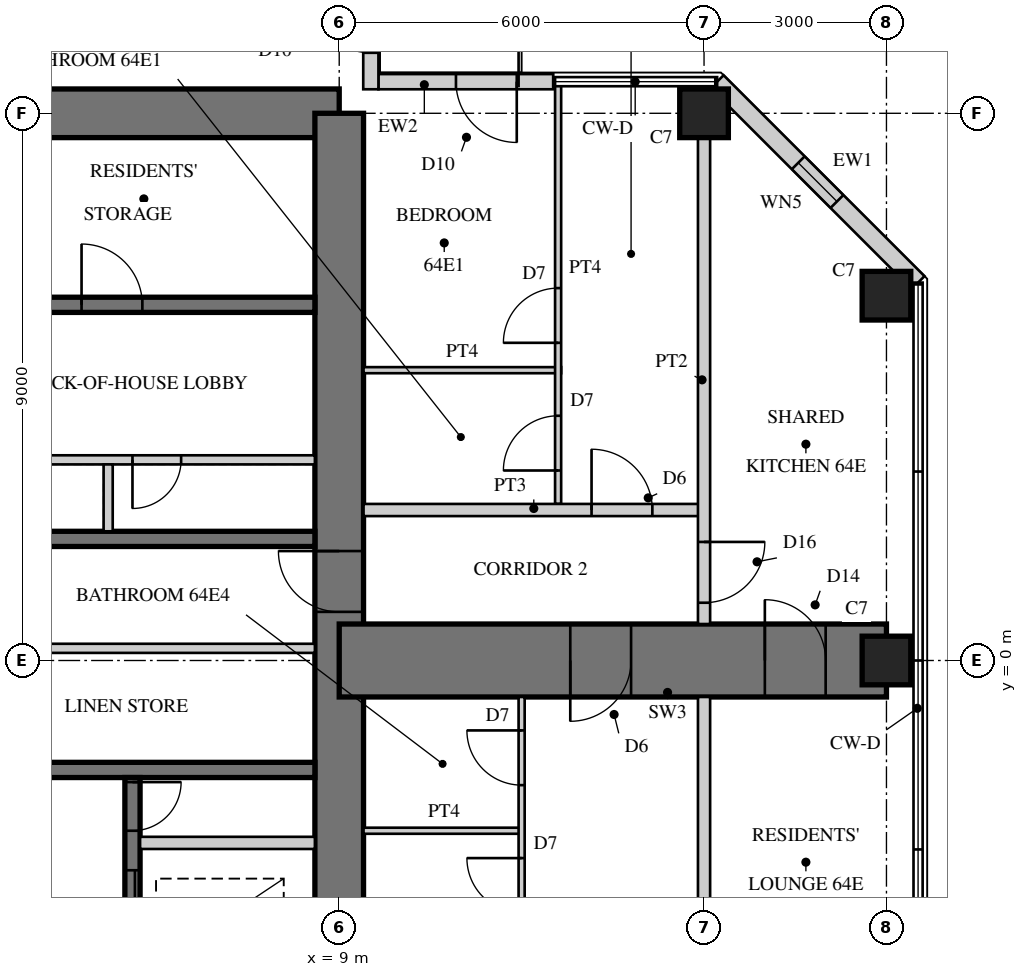
"""IFC4 building model, lengths in metres.
Left out: names, types, materials, properties, quantities, classifications, styles, units other than length and angle.
Written with IfcOpenShell. Run it as: python <this file> out.ifc"""

import sys

from ifc_helpers import new_model, si_unit, direction, frame, frame_2d, origin, origin_2d, place, context, subcontext, project, spatial, rectangle, hollow_rectangle, extrude, element, fill, save


model = new_model("IFC4")
c1 = context("Model", 3, precision=1e-05, world=origin(), true_north=direction((0.0, 1.0)))
c2 = subcontext(c1, "Body", "Model", "MODEL_VIEW")
j1 = project(units=[si_unit("LENGTHUNIT", "METRE"), si_unit("PLANEANGLEUNIT", "RADIAN")], contexts=[c1])
p1 = place(None, origin())
s1 = spatial("IfcSite", under=j1, at=p1, CompositionType="ELEMENT")
p2 = place(p1, origin())
s2 = spatial("IfcBuilding", under=s1, at=p2, CompositionType="ELEMENT")
p3 = place(p2, frame((0.0, 0.0, 249.3)))
s3 = spatial("IfcBuildingStorey", under=s2, at=p3, CompositionType="ELEMENT", Elevation=249.3)
p4 = place(p3, frame((9.0, 9.0, 0.0), z_axis=(0.0, 0.0, 1.0), x_axis=(-1.0, 0.0, 0.0)))
e1 = element("IfcWall", 1, at=p4, inside=s3, PredefinedType="SHEAR", context=c2, shape_type="SweptSolid", body=[
    extrude(rectangle(XDim=18.0, YDim=0.8, at=frame_2d((9.0, 0.0))), origin(), (0.0, 0.0, 1.0), 3.4),
])
p5 = place(p4, frame((9.8, 0.0, 0.0)))
e2 = element("IfcOpeningElement", 2, at=p5, cuts=e1, PredefinedType="OPENING", context=c2, shape_type="SweptSolid", body=[
    extrude(rectangle(XDim=1.0, YDim=2.4, at=frame_2d((0.5, 1.2))), frame((0.0, 0.41, 0.0), z_axis=(0.0, -1.0, 0.0), x_axis=(1.0, 0.0, 0.0)), (0.0, 0.0, 1.0), 0.82),
])
p6 = place(p3, frame((9.0, -9.0, 0.0), z_axis=(0.0, 0.0, 1.0), x_axis=(0.0, 1.0, 0.0)))
e3 = element("IfcWall", 3, at=p6, inside=s3, PredefinedType="SHEAR", context=c2, shape_type="SweptSolid", body=[
    extrude(rectangle(XDim=18.0, YDim=0.8, at=frame_2d((9.0, 0.0))), origin(), (0.0, 0.0, 1.0), 3.4),
])
p7 = place(p6, frame((9.8, 0.0, 0.0)))
e4 = element("IfcOpeningElement", 4, at=p7, cuts=e3, PredefinedType="OPENING", context=c2, shape_type="SweptSolid", body=[
    extrude(rectangle(XDim=1.0, YDim=2.4, at=frame_2d((0.5, 1.2))), frame((0.0, 0.41, 0.0), z_axis=(0.0, -1.0, 0.0), x_axis=(1.0, 0.0, 0.0)), (0.0, 0.0, 1.0), 0.82),
])
p8 = place(p3, frame((1.925, 2.0, 0.0), z_axis=(0.0, 0.0, 1.0), x_axis=(1.0, 0.0, 0.0)))
e5 = element("IfcWall", 5, at=p8, inside=s3, PredefinedType="SHEAR", context=c2, shape_type="SweptSolid", body=[
    extrude(rectangle(XDim=6.675, YDim=0.25, at=frame_2d((3.337, 0.0))), origin(), (0.0, 0.0, 1.0), 3.4),
])
p9 = place(p3, frame((1.925, 5.85, 0.0), z_axis=(0.0, 0.0, 1.0), x_axis=(1.0, 0.0, 0.0)))
e6 = element("IfcWall", 6, at=p9, inside=s3, PredefinedType="SHEAR", context=c2, shape_type="SweptSolid", body=[
    extrude(rectangle(XDim=6.675, YDim=0.25, at=frame_2d((3.337, 0.0))), origin(), (0.0, 0.0, 1.0), 3.4),
])
p10 = place(p9, frame((0.546, 0.0, 0.0)))
e7 = element("IfcOpeningElement", 7, at=p10, cuts=e6, PredefinedType="OPENING", context=c2, shape_type="SweptSolid", body=[
    extrude(rectangle(XDim=1.0, YDim=2.1, at=frame_2d((0.5, 1.05))), frame((0.0, 0.135, 0.0), z_axis=(0.0, -1.0, 0.0), x_axis=(1.0, 0.0, 0.0)), (0.0, 0.0, 1.0), 0.27),
])
p11 = place(p9, frame((2.837, 0.0, 0.0)))
e8 = element("IfcOpeningElement", 8, at=p11, cuts=e6, PredefinedType="OPENING", context=c2, shape_type="SweptSolid", body=[
    extrude(rectangle(XDim=1.0, YDim=2.1, at=frame_2d((0.5, 1.05))), frame((0.0, 0.135, 0.0), z_axis=(0.0, -1.0, 0.0), x_axis=(1.0, 0.0, 0.0)), (0.0, 0.0, 1.0), 0.27),
])
p12 = place(p3, frame((1.925, 3.3, 0.0), z_axis=(0.0, 0.0, 1.0), x_axis=(1.0, 0.0, 0.0)))
e9 = element("IfcWall", 9, at=p12, inside=s3, PredefinedType="PARTITIONING", context=c2, shape_type="SweptSolid", body=[
    extrude(rectangle(XDim=6.675, YDim=0.15, at=frame_2d((3.337, 0.0))), origin(), (0.0, 0.0, 1.0), 3.4),
])
p13 = place(p12, frame((0.075, 0.0, 0.0)))
e10 = element("IfcOpeningElement", 10, at=p13, cuts=e9, PredefinedType="OPENING", context=c2, shape_type="SweptSolid", body=[
    extrude(rectangle(XDim=0.8, YDim=2.1, at=frame_2d((0.4, 1.05))), frame((0.0, 0.085, 0.0), z_axis=(0.0, -1.0, 0.0), x_axis=(1.0, 0.0, 0.0)), (0.0, 0.0, 1.0), 0.17),
])
p14 = place(p12, frame((3.675, 0.0, 0.0)))
e11 = element("IfcOpeningElement", 11, at=p14, cuts=e9, PredefinedType="OPENING", context=c2, shape_type="SweptSolid", body=[
    extrude(rectangle(XDim=0.8, YDim=2.1, at=frame_2d((0.4, 1.05))), frame((0.0, 0.085, 0.0), z_axis=(0.0, -1.0, 0.0), x_axis=(1.0, 0.0, 0.0)), (0.0, 0.0, 1.0), 0.17),
])
p15 = place(p3, frame((5.2, 2.125, 0.0), z_axis=(0.0, 0.0, 1.0), x_axis=(0.0, 1.0, 0.0)))
e12 = element("IfcWall", 12, at=p15, inside=s3, PredefinedType="PARTITIONING", context=c2, shape_type="SweptSolid", body=[
    extrude(rectangle(XDim=1.1, YDim=0.15, at=frame_2d((0.55, 0.0))), origin(), (0.0, 0.0, 1.0), 3.4),
])
p16 = place(p3, frame((2.125, -1.8, 0.0), z_axis=(0.0, 0.0, 1.0), x_axis=(1.0, 0.0, 0.0)))
e13 = element("IfcWall", 13, at=p16, inside=s3, PredefinedType="SHEAR", context=c2, shape_type="SweptSolid", body=[
    extrude(rectangle(XDim=6.475, YDim=0.25, at=frame_2d((3.238, 0.0))), origin(), (0.0, 0.0, 1.0), 3.4),
])
p17 = place(p3, frame((5.6, -1.925, 0.0), z_axis=(0.0, 0.0, 1.0), x_axis=(0.0, -1.0, 0.0)))
e14 = element("IfcWall", 14, at=p17, inside=s3, PredefinedType="SHEAR", context=c2, shape_type="SweptSolid", body=[
    extrude(rectangle(XDim=3.55, YDim=0.25, at=frame_2d((1.775, 0.0))), origin(), (0.0, 0.0, 1.0), 3.4),
])
p18 = place(p17, frame((1.525, 0.0, 0.0)))
e15 = element("IfcOpeningElement", 15, at=p18, cuts=e14, PredefinedType="OPENING", context=c2, shape_type="SweptSolid", body=[
    extrude(rectangle(XDim=1.1, YDim=2.2, at=frame_2d((0.55, 1.1))), frame((0.0, 0.135, 0.0), z_axis=(0.0, -1.0, 0.0), x_axis=(1.0, 0.0, 0.0)), (0.0, 0.0, 1.0), 0.27),
])
p19 = place(p17, frame((0.075, 0.0, 0.0)))
e16 = element("IfcOpeningElement", 16, at=p19, cuts=e14, PredefinedType="OPENING", context=c2, shape_type="SweptSolid", body=[
    extrude(rectangle(XDim=0.8, YDim=2.1, at=frame_2d((0.4, 1.05))), frame((0.0, 0.135, 0.0), z_axis=(0.0, -1.0, 0.0), x_axis=(1.0, 0.0, 0.0)), (0.0, 0.0, 1.0), 0.27),
])
p20 = place(p3, frame((5.725, -3.0, 0.0), z_axis=(0.0, 0.0, 1.0), x_axis=(1.0, 0.0, 0.0)))
e17 = element("IfcWall", 17, at=p20, inside=s3, PredefinedType="PARTITIONING", context=c2, shape_type="SweptSolid", body=[
    extrude(rectangle(XDim=2.875, YDim=0.2, at=frame_2d((1.438, 0.0))), origin(), (0.0, 0.0, 1.0), 3.4),
])
p21 = place(p3, frame((9.0, 0.0, 0.0), z_axis=(0.0, 0.0, 1.0), x_axis=(1.0, 0.0, 0.0)))
e18 = element("IfcWall", 18, at=p21, inside=s3, PredefinedType="SHEAR", context=c2, shape_type="SweptSolid", body=[
    extrude(rectangle(XDim=9.0, YDim=1.2, at=frame_2d((4.5, 0.0))), origin(), (0.0, 0.0, 1.0), 3.4),
])
p22 = place(p21, frame((3.8, 0.0, 0.0)))
e19 = element("IfcOpeningElement", 19, at=p22, cuts=e18, PredefinedType="OPENING", context=c2, shape_type="SweptSolid", body=[
    extrude(rectangle(XDim=1.0, YDim=2.15, at=frame_2d((0.5, 1.075))), frame((0.0, 0.61, 0.0), z_axis=(0.0, -1.0, 0.0), x_axis=(1.0, 0.0, 0.0)), (0.0, 0.0, 1.0), 1.22),
])
p23 = place(p21, frame((7.0, 0.0, 0.0)))
e20 = element("IfcOpeningElement", 20, at=p23, cuts=e18, PredefinedType="OPENING", context=c2, shape_type="SweptSolid", body=[
    extrude(rectangle(XDim=1.0, YDim=2.2, at=frame_2d((0.5, 1.1))), frame((0.0, 0.61, 0.0), z_axis=(0.0, -1.0, 0.0), x_axis=(1.0, 0.0, 0.0)), (0.0, 0.0, 1.0), 1.22),
])
for number, where, z_axis, x_axis in (
    (21, (15.0, 9.0, 0.0), (0.0, 0.0, 1.0), (1.0, 0.0, 0.0)),
    (22, (18.0, 0.0, 0.0), (0.0, 0.0, 1.0), (1.0, 0.0, 0.0)),
    (23, (18.0, 6.0, 0.0), (0.0, 0.0, 1.0), (1.0, 0.0, 0.0)),
):
    element("IfcColumn", number, at=place(p3, frame(where, z_axis=z_axis, x_axis=x_axis)), inside=s3, PredefinedType="COLUMN", context=c2, shape_type="SweptSolid", body=[
        extrude(rectangle(XDim=0.8, YDim=0.8, at=origin_2d()), origin(), (0.0, 0.0, 1.0), 3.4),
    ])
p24 = place(p3, frame((18.52, 6.215, 0.0), z_axis=(0.0, 0.0, 1.0), x_axis=(-0.707106781187, 0.707106781187, 0.0)))
e24 = element("IfcWall", 24, at=p24, inside=s3, PredefinedType="SOLIDWALL", context=c2, shape_type="SweptSolid", body=[
    extrude(rectangle(XDim=4.674, YDim=0.3, at=frame_2d((2.337, 0.0))), origin(), (0.0, 0.0, 1.0), 3.15),
])
p25 = place(p24, frame((1.887, 0.0, 0.3)))
e25 = element("IfcOpeningElement", 25, at=p25, cuts=e24, PredefinedType="OPENING", context=c2, shape_type="SweptSolid", body=[
    extrude(rectangle(XDim=0.9, YDim=2.4, at=frame_2d((0.45, 1.2))), frame((0.0, 0.16, 0.0), z_axis=(0.0, -1.0, 0.0), x_axis=(1.0, 0.0, 0.0)), (0.0, 0.0, 1.0), 0.32),
])
p26 = place(p3, frame((12.52, 9.52, 0.0), z_axis=(0.0, 0.0, 1.0), x_axis=(-1.0, 0.0, 0.0)))
e26 = element("IfcWall", 26, at=p26, inside=s3, PredefinedType="SOLIDWALL", context=c2, shape_type="SweptSolid", body=[
    extrude(rectangle(XDim=2.875, YDim=0.25, at=frame_2d((1.438, 0.0))), origin(), (0.0, 0.0, 1.0), 3.15),
])
p27 = place(p26, frame((0.6, 0.0, 0.0)))
e27 = element("IfcOpeningElement", 27, at=p27, cuts=e26, PredefinedType="OPENING", context=c2, shape_type="SweptSolid", body=[
    extrude(rectangle(XDim=1.0, YDim=2.2, at=frame_2d((0.5, 1.1))), frame((0.0, 0.135, 0.0), z_axis=(0.0, -1.0, 0.0), x_axis=(1.0, 0.0, 0.0)), (0.0, 0.0, 1.0), 0.27),
])
p28 = place(p3, frame((9.52, 9.395, 0.0), z_axis=(0.0, 0.0, 1.0), x_axis=(0.0, 1.0, 0.0)))
e28 = element("IfcWall", 28, at=p28, inside=s3, PredefinedType="SOLIDWALL", context=c2, shape_type="SweptSolid", body=[
    extrude(rectangle(XDim=3.125, YDim=0.25, at=frame_2d((1.562, 0.0))), origin(), (0.0, 0.0, 1.0), 3.15),
])
p29 = place(p28, frame((0.6, 0.0, 0.0)))
e29 = element("IfcOpeningElement", 29, at=p29, cuts=e28, PredefinedType="OPENING", context=c2, shape_type="SweptSolid", body=[
    extrude(rectangle(XDim=1.0, YDim=2.2, at=frame_2d((0.5, 1.1))), frame((0.0, 0.135, 0.0), z_axis=(0.0, -1.0, 0.0), x_axis=(1.0, 0.0, 0.0)), (0.0, 0.0, 1.0), 0.27),
])
p30 = place(p3, frame((2.325, 0.2, 0.0), z_axis=(0.0, 0.0, 1.0), x_axis=(1.0, 0.0, 0.0)))
e30 = element("IfcWall", 30, at=p30, inside=s3, PredefinedType="PARTITIONING", context=c2, shape_type="SweptSolid", body=[
    extrude(rectangle(XDim=6.275, YDim=0.15, at=frame_2d((3.138, 0.0))), origin(), (0.0, 0.0, 1.0), 3.15),
])
p31 = place(p30, frame((0.4, 0.0, 0.0)))
e31 = element("IfcOpeningElement", 31, at=p31, cuts=e30, PredefinedType="OPENING", context=c2, shape_type="SweptSolid", body=[
    extrude(rectangle(XDim=1.0, YDim=2.1, at=frame_2d((0.5, 1.05))), frame((0.0, 0.085, 0.0), z_axis=(0.0, -1.0, 0.0), x_axis=(1.0, 0.0, 0.0)), (0.0, 0.0, 1.0), 0.17),
])
p32 = place(p3, frame((9.4, 4.775, 0.0), z_axis=(0.0, 0.0, 1.0), x_axis=(1.0, 0.0, 0.0)))
e32 = element("IfcWall", 32, at=p32, inside=s3, PredefinedType="PARTITIONING", context=c2, shape_type="SweptSolid", body=[
    extrude(rectangle(XDim=3.25, YDim=0.1, at=frame_2d((1.625, 0.0))), origin(), (0.0, 0.0, 1.0), 3.15),
])
p33 = place(p3, frame((12.6, 2.575, 0.0), z_axis=(0.0, 0.0, 1.0), x_axis=(0.0, 1.0, 0.0)))
e33 = element("IfcWall", 33, at=p33, inside=s3, PredefinedType="PARTITIONING", context=c2, shape_type="SweptSolid", body=[
    extrude(rectangle(XDim=6.905, YDim=0.1, at=frame_2d((3.453, 0.0))), origin(), (0.0, 0.0, 1.0), 3.15),
])
p34 = place(p33, frame((0.55, 0.0, 0.0)))
e34 = element("IfcOpeningElement", 34, at=p34, cuts=e33, PredefinedType="OPENING", context=c2, shape_type="SweptSolid", body=[
    extrude(rectangle(XDim=0.9, YDim=2.1, at=frame_2d((0.45, 1.05))), frame((0.0, 0.06, 0.0), z_axis=(0.0, -1.0, 0.0), x_axis=(1.0, 0.0, 0.0)), (0.0, 0.0, 1.0), 0.12),
])
p35 = place(p33, frame((2.65, 0.0, 0.0)))
e35 = element("IfcOpeningElement", 35, at=p35, cuts=e33, PredefinedType="OPENING", context=c2, shape_type="SweptSolid", body=[
    extrude(rectangle(XDim=0.9, YDim=2.1, at=frame_2d((0.45, 1.05))), frame((0.0, 0.06, 0.0), z_axis=(0.0, -1.0, 0.0), x_axis=(1.0, 0.0, 0.0)), (0.0, 0.0, 1.0), 0.12),
])
p36 = place(p3, frame((9.4, -2.8, 0.0), z_axis=(0.0, 0.0, 1.0), x_axis=(1.0, 0.0, 0.0)))
e36 = element("IfcWall", 36, at=p36, inside=s3, PredefinedType="PARTITIONING", context=c2, shape_type="SweptSolid", body=[
    extrude(rectangle(XDim=2.65, YDim=0.1, at=frame_2d((1.325, 0.0))), origin(), (0.0, 0.0, 1.0), 3.15),
])
p37 = place(p3, frame((12.0, -9.395, 0.0), z_axis=(0.0, 0.0, 1.0), x_axis=(0.0, 1.0, 0.0)))
e37 = element("IfcWall", 37, at=p37, inside=s3, PredefinedType="PARTITIONING", context=c2, shape_type="SweptSolid", body=[
    extrude(rectangle(XDim=8.795, YDim=0.1, at=frame_2d((4.397, 0.0))), origin(), (0.0, 0.0, 1.0), 3.15),
])
p38 = place(p37, frame((5.245, 0.0, 0.0)))
e38 = element("IfcOpeningElement", 38, at=p38, cuts=e37, PredefinedType="OPENING", context=c2, shape_type="SweptSolid", body=[
    extrude(rectangle(XDim=0.9, YDim=2.1, at=frame_2d((0.45, 1.05))), frame((0.0, 0.06, 0.0), z_axis=(0.0, -1.0, 0.0), x_axis=(1.0, 0.0, 0.0)), (0.0, 0.0, 1.0), 0.12),
])
p39 = place(p37, frame((7.345, 0.0, 0.0)))
e39 = element("IfcOpeningElement", 39, at=p39, cuts=e37, PredefinedType="OPENING", context=c2, shape_type="SweptSolid", body=[
    extrude(rectangle(XDim=0.9, YDim=2.1, at=frame_2d((0.45, 1.05))), frame((0.0, 0.06, 0.0), z_axis=(0.0, -1.0, 0.0), x_axis=(1.0, 0.0, 0.0)), (0.0, 0.0, 1.0), 0.12),
])
p40 = place(p3, frame((9.4, 2.475, 0.0), z_axis=(0.0, 0.0, 1.0), x_axis=(1.0, 0.0, 0.0)))
e40 = element("IfcWall", 40, at=p40, inside=s3, PredefinedType="SOLIDWALL", context=c2, shape_type="SweptSolid", body=[
    extrude(rectangle(XDim=5.6, YDim=0.2, at=frame_2d((2.8, 0.0))), origin(), (0.0, 0.0, 1.0), 3.15),
])
p41 = place(p40, frame((3.75, 0.0, 0.0)))
e41 = element("IfcOpeningElement", 41, at=p41, cuts=e40, PredefinedType="OPENING", context=c2, shape_type="SweptSolid", body=[
    extrude(rectangle(XDim=1.0, YDim=2.15, at=frame_2d((0.5, 1.075))), frame((0.0, 0.11, 0.0), z_axis=(0.0, -1.0, 0.0), x_axis=(1.0, 0.0, 0.0)), (0.0, 0.0, 1.0), 0.22),
])
p42 = place(p3, frame((15.0, -8.6, 0.0), z_axis=(0.0, 0.0, 1.0), x_axis=(0.0, 1.0, 0.0)))
e42 = element("IfcWall", 42, at=p42, inside=s3, PredefinedType="SOLIDWALL", context=c2, shape_type="SweptSolid", body=[
    extrude(rectangle(XDim=8.0, YDim=0.2, at=frame_2d((4.0, 0.0))), origin(), (0.0, 0.0, 1.0), 2.1),
])
p43 = place(p3, frame((15.0, 0.6, 0.0), z_axis=(0.0, 0.0, 1.0), x_axis=(0.0, 1.0, 0.0)))
e43 = element("IfcWall", 43, at=p43, inside=s3, PredefinedType="SOLIDWALL", context=c2, shape_type="SweptSolid", body=[
    extrude(rectangle(XDim=8.0, YDim=0.2, at=frame_2d((4.0, 0.0))), origin(), (0.0, 0.0, 1.0), 2.1),
])
p44 = place(p43, frame((0.35, 0.0, 0.0)))
e44 = element("IfcOpeningElement", 44, at=p44, cuts=e43, PredefinedType="OPENING", context=c2, shape_type="SweptSolid", body=[
    extrude(rectangle(XDim=1.0, YDim=2.0, at=frame_2d((0.5, 1.0))), frame((0.0, 0.11, 0.0), z_axis=(0.0, -1.0, 0.0), x_axis=(1.0, 0.0, 0.0)), (0.0, 0.0, 1.0), 0.22),
])
p45 = place(p25, origin())
e45 = element("IfcWindow", 45, at=p45, inside=s3, PartitioningType="SINGLE_PANEL", PredefinedType="WINDOW", context=c2, shape_type="SweptSolid", body=[
    extrude(hollow_rectangle(XDim=0.9, YDim=2.4, WallThickness=0.06, at=frame_2d((0.45, 1.2))), frame((0.0, 0.03, 0.0), z_axis=(0.0, -1.0, 0.0), x_axis=(1.0, 0.0, 0.0)), (0.0, 0.0, 1.0), 0.06),
    extrude(rectangle(XDim=0.779, YDim=2.279, at=frame_2d((0.45, 1.2))), frame((0.0, 0.03, 0.0), z_axis=(0.0, -1.0, 0.0), x_axis=(1.0, 0.0, 0.0)), (0.0, 0.0, 1.0), 0.06),
])
fill(e25, e45)
p46 = place(p27, origin())
e46 = element("IfcDoor", 46, at=p46, inside=s3, OperationType="SINGLE_SWING_LEFT", PredefinedType="DOOR", context=c2, shape_type="SweptSolid", body=[
    extrude(hollow_rectangle(XDim=1.0, YDim=2.2, WallThickness=0.06, at=frame_2d((0.5, 1.1))), frame((0.0, 0.025, 0.0), z_axis=(0.0, -1.0, 0.0), x_axis=(1.0, 0.0, 0.0)), (0.0, 0.0, 1.0), 0.05),
    extrude(rectangle(XDim=0.879, YDim=2.079, at=frame_2d((0.5, 1.1))), frame((0.0, 0.025, 0.0), z_axis=(0.0, -1.0, 0.0), x_axis=(1.0, 0.0, 0.0)), (0.0, 0.0, 1.0), 0.05),
])
fill(e27, e46)
p47 = place(p29, origin())
e47 = element("IfcDoor", 47, at=p47, inside=s3, OperationType="SINGLE_SWING_RIGHT", PredefinedType="DOOR", context=c2, shape_type="SweptSolid", body=[
    extrude(hollow_rectangle(XDim=1.0, YDim=2.2, WallThickness=0.06, at=frame_2d((0.5, 1.1))), frame((0.0, 0.025, 0.0), z_axis=(0.0, -1.0, 0.0), x_axis=(1.0, 0.0, 0.0)), (0.0, 0.0, 1.0), 0.05),
    extrude(rectangle(XDim=0.879, YDim=2.079, at=frame_2d((0.5, 1.1))), frame((0.0, 0.025, 0.0), z_axis=(0.0, -1.0, 0.0), x_axis=(1.0, 0.0, 0.0)), (0.0, 0.0, 1.0), 0.05),
])
fill(e29, e47)
p48 = place(p34, origin())
e48 = element("IfcDoor", 48, at=p48, inside=s3, OperationType="SINGLE_SWING_LEFT", PredefinedType="DOOR", context=c2, shape_type="SweptSolid", body=[
    extrude(rectangle(XDim=0.9, YDim=2.1, at=frame_2d((0.45, 1.05))), frame((0.0, 0.025, 0.0), z_axis=(0.0, -1.0, 0.0), x_axis=(1.0, 0.0, 0.0)), (0.0, 0.0, 1.0), 0.05),
])
fill(e34, e48)
p49 = place(p35, origin())
e49 = element("IfcDoor", 49, at=p49, inside=s3, OperationType="SINGLE_SWING_LEFT", PredefinedType="DOOR", context=c2, shape_type="SweptSolid", body=[
    extrude(rectangle(XDim=0.9, YDim=2.1, at=frame_2d((0.45, 1.05))), frame((0.0, 0.025, 0.0), z_axis=(0.0, -1.0, 0.0), x_axis=(1.0, 0.0, 0.0)), (0.0, 0.0, 1.0), 0.05),
])
fill(e35, e49)
p50 = place(p38, origin())
e50 = element("IfcDoor", 50, at=p50, inside=s3, OperationType="SINGLE_SWING_RIGHT", PredefinedType="DOOR", context=c2, shape_type="SweptSolid", body=[
    extrude(rectangle(XDim=0.9, YDim=2.1, at=frame_2d((0.45, 1.05))), frame((0.0, 0.025, 0.0), z_axis=(0.0, -1.0, 0.0), x_axis=(1.0, 0.0, 0.0)), (0.0, 0.0, 1.0), 0.05),
])
fill(e38, e50)
p51 = place(p39, origin())
e51 = element("IfcDoor", 51, at=p51, inside=s3, OperationType="SINGLE_SWING_RIGHT", PredefinedType="DOOR", context=c2, shape_type="SweptSolid", body=[
    extrude(rectangle(XDim=0.9, YDim=2.1, at=frame_2d((0.45, 1.05))), frame((0.0, 0.025, 0.0), z_axis=(0.0, -1.0, 0.0), x_axis=(1.0, 0.0, 0.0)), (0.0, 0.0, 1.0), 0.05),
])
fill(e39, e51)
p52 = place(p41, origin())
e52 = element("IfcDoor", 52, at=p52, inside=s3, OperationType="SINGLE_SWING_LEFT", PredefinedType="DOOR", context=c2, shape_type="SweptSolid", body=[
    extrude(rectangle(XDim=1.0, YDim=2.15, at=frame_2d((0.5, 1.075))), frame((0.0, 0.025, 0.0), z_axis=(0.0, -1.0, 0.0), x_axis=(1.0, 0.0, 0.0)), (0.0, 0.0, 1.0), 0.05),
])
fill(e41, e52)
p53 = place(p44, frame((1.0, 0.0, 0.0), z_axis=(0.0, 0.0, 1.0), x_axis=(-1.0, 0.0, 0.0)))
e53 = element("IfcDoor", 53, at=p53, inside=s3, OperationType="SINGLE_SWING_LEFT", PredefinedType="DOOR", context=c2, shape_type="SweptSolid", body=[
    extrude(rectangle(XDim=1.0, YDim=2.0, at=frame_2d((0.5, 1.0))), frame((0.0, 0.025, 0.0), z_axis=(0.0, -1.0, 0.0), x_axis=(1.0, 0.0, 0.0)), (0.0, 0.0, 1.0), 0.05),
])
fill(e44, e53)
p54 = place(p22, frame((1.0, 0.0, 0.0), z_axis=(0.0, 0.0, 1.0), x_axis=(-1.0, 0.0, 0.0)))
e54 = element("IfcDoor", 54, at=p54, inside=s3, OperationType="SINGLE_SWING_RIGHT", PredefinedType="DOOR", context=c2, shape_type="SweptSolid", body=[
    extrude(rectangle(XDim=1.0, YDim=2.15, at=frame_2d((0.5, 1.075))), frame((0.0, 0.025, 0.0), z_axis=(0.0, -1.0, 0.0), x_axis=(1.0, 0.0, 0.0)), (0.0, 0.0, 1.0), 0.05),
])
fill(e19, e54)
p55 = place(p23, origin())
e55 = element("IfcDoor", 55, at=p55, inside=s3, OperationType="SINGLE_SWING_LEFT", PredefinedType="DOOR", context=c2, shape_type="SweptSolid", body=[
    extrude(rectangle(XDim=1.0, YDim=2.2, at=frame_2d((0.5, 1.1))), frame((0.0, 0.025, 0.0), z_axis=(0.0, -1.0, 0.0), x_axis=(1.0, 0.0, 0.0)), (0.0, 0.0, 1.0), 0.05),
])
fill(e20, e55)
p56 = place(p7, origin())
e56 = element("IfcDoor", 56, at=p56, inside=s3, OperationType="SINGLE_SWING_RIGHT", PredefinedType="DOOR", context=c2, shape_type="SweptSolid", body=[
    extrude(rectangle(XDim=1.0, YDim=2.4, at=frame_2d((0.5, 1.2))), frame((0.0, 0.055, 0.0), z_axis=(0.0, -1.0, 0.0), x_axis=(1.0, 0.0, 0.0)), (0.0, 0.0, 1.0), 0.05),
])
fill(e4, e56)
p57 = place(p14, frame((0.8, 0.0, 0.0), z_axis=(0.0, 0.0, 1.0), x_axis=(-1.0, 0.0, 0.0)))
e57 = element("IfcDoor", 57, at=p57, inside=s3, OperationType="SINGLE_SWING_RIGHT", PredefinedType="DOOR", context=c2, shape_type="SweptSolid", body=[
    extrude(rectangle(XDim=0.8, YDim=2.1, at=frame_2d((0.4, 1.05))), frame((0.0, 0.025, 0.0), z_axis=(0.0, -1.0, 0.0), x_axis=(1.0, 0.0, 0.0)), (0.0, 0.0, 1.0), 0.05),
])
fill(e11, e57)
p58 = place(p18, origin())
e58 = element("IfcDoor", 58, at=p58, inside=s3, OperationType="DOUBLE_DOOR_SLIDING", PredefinedType="DOOR", context=c2, shape_type="SweptSolid", body=[
    extrude(rectangle(XDim=1.1, YDim=2.2, at=frame_2d((0.55, 1.1))), frame((0.0, 0.025, 0.0), z_axis=(0.0, -1.0, 0.0), x_axis=(1.0, 0.0, 0.0)), (0.0, 0.0, 1.0), 0.05),
])
fill(e15, e58)
p59 = place(p19, origin())
e59 = element("IfcDoor", 59, at=p59, inside=s3, OperationType="SINGLE_SWING_LEFT", PredefinedType="DOOR", context=c2, shape_type="SweptSolid", body=[
    extrude(rectangle(XDim=0.8, YDim=2.1, at=frame_2d((0.4, 1.05))), frame((0.0, 0.025, 0.0), z_axis=(0.0, -1.0, 0.0), x_axis=(1.0, 0.0, 0.0)), (0.0, 0.0, 1.0), 0.05),
])
fill(e16, e59)
p60 = place(p11, origin())
e60 = element("IfcDoor", 60, at=p60, inside=s3, OperationType="SINGLE_SWING_LEFT", PredefinedType="DOOR", context=c2, shape_type="SweptSolid", body=[
    extrude(rectangle(XDim=1.0, YDim=2.1, at=frame_2d((0.5, 1.05))), frame((0.0, 0.025, 0.0), z_axis=(0.0, -1.0, 0.0), x_axis=(1.0, 0.0, 0.0)), (0.0, 0.0, 1.0), 0.05),
])
fill(e8, e60)
save(model, sys.argv[1])
